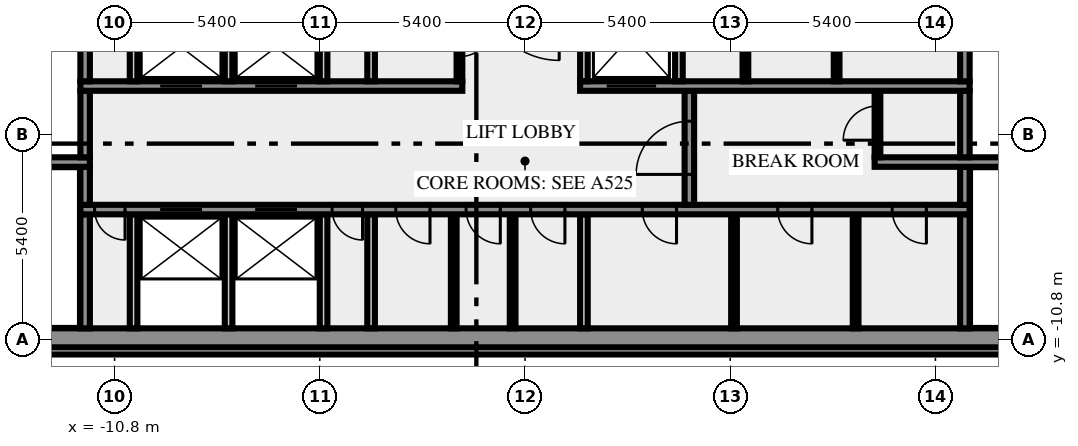
"""IFC4 building model, lengths in metres.
Left out: names, types, materials, properties, quantities, classifications, styles, units other than length and angle.
Written with IfcOpenShell. Run it as: python <this file> out.ifc"""

import sys

from ifc_helpers import new_model, si_unit, direction, frame, frame_2d, origin, place, context, subcontext, project, spatial, rectangle, extrude, element, fill, save


model = new_model("IFC4")
c1 = context("Model", 3, precision=1e-05, world=origin(), true_north=direction((0.0, 1.0)))
c2 = subcontext(c1, "Body", "Model", "MODEL_VIEW")
j1 = project(units=[si_unit("LENGTHUNIT", "METRE"), si_unit("PLANEANGLEUNIT", "RADIAN")], contexts=[c1])
p1 = place(None, origin())
s1 = spatial("IfcSite", under=j1, at=p1, CompositionType="ELEMENT")
p2 = place(p1, origin())
s2 = spatial("IfcBuilding", under=s1, at=p2, CompositionType="ELEMENT")
p3 = place(p2, frame((0.0, 0.0, 339.0)))
s3 = spatial("IfcBuildingStorey", under=s2, at=p3, CompositionType="ELEMENT", Elevation=339.0)
p4 = place(p3, frame((-17.444, -11.088, 0.0), z_axis=(0.0, 0.0, 1.0), x_axis=(1.0, 0.0, 0.0)))
e1 = element("IfcWall", 1, at=p4, inside=s3, PredefinedType="SOLIDWALL", context=c2, shape_type="SweptSolid", body=[
    extrude(rectangle(XDim=34.888, YDim=0.2, at=frame_2d((17.444, 0.0))), origin(), (0.0, 0.0, 1.0), 3.65),
])
p5 = place(p3, frame((-20.0, -10.75, 0.0), z_axis=(0.0, 0.0, 1.0), x_axis=(1.0, 0.0, 0.0)))
e2 = element("IfcWall", 2, at=p5, inside=s3, PredefinedType="SHEAR", context=c2, shape_type="SweptSolid", body=[
    extrude(rectangle(XDim=40.0, YDim=0.5, at=frame_2d((20.0, 0.0))), origin(), (0.0, 0.0, 1.0), 3.65),
])
p6 = place(p5, frame((0.8, 0.0, 1.0)))
e3 = element("IfcOpeningElement", 3, at=p6, cuts=e2, PredefinedType="OPENING", context=c2, shape_type="SweptSolid", body=[
    extrude(rectangle(XDim=1.2, YDim=1.2, at=frame_2d((0.6, 0.6))), frame((0.0, 0.26, 0.0), z_axis=(0.0, -1.0, 0.0), x_axis=(1.0, 0.0, 0.0)), (0.0, 0.0, 1.0), 0.52),
])
p7 = place(p5, frame((38.0, 0.0, 1.0)))
e4 = element("IfcOpeningElement", 4, at=p7, cuts=e2, PredefinedType="OPENING", context=c2, shape_type="SweptSolid", body=[
    extrude(rectangle(XDim=1.2, YDim=1.2, at=frame_2d((0.6, 0.6))), frame((0.0, 0.26, 0.0), z_axis=(0.0, -1.0, 0.0), x_axis=(1.0, 0.0, 0.0)), (0.0, 0.0, 1.0), 0.52),
])
p8 = place(p3, frame((-11.575, -10.5, 0.0), z_axis=(0.0, 0.0, 1.0), x_axis=(0.0, 1.0, 0.0)))
e5 = element("IfcWall", 5, at=p8, inside=s3, PredefinedType="SHEAR", context=c2, shape_type="SweptSolid", body=[
    extrude(rectangle(XDim=3.0, YDim=0.25, at=frame_2d((1.5, 0.0))), origin(), (0.0, 0.0, 1.0), 3.65),
])
for number, where, z_axis, x_axis in (
    (6, (-10.3, -10.5, 0.0), (0.0, 0.0, 1.0), (0.0, 1.0, 0.0)),
    (7, (-7.8, -10.5, 0.0), (0.0, 0.0, 1.0), (0.0, 1.0, 0.0)),
    (8, (-5.3, -10.5, 0.0), (0.0, 0.0, 1.0), (0.0, 1.0, 0.0)),
    (9, (-4.05, -10.5, 0.0), (0.0, 0.0, 1.0), (0.0, 1.0, 0.0)),
):
    element("IfcWall", number, at=place(p3, frame(where, z_axis=z_axis, x_axis=x_axis)), inside=s3, PredefinedType="SOLIDWALL", context=c2, shape_type="SweptSolid", body=[
        extrude(rectangle(XDim=3.0, YDim=0.2, at=frame_2d((1.5, 0.0))), origin(), (0.0, 0.0, 1.0), 3.65),
    ])
for number, where, z_axis, x_axis in (
    (10, (-1.875, -10.5, 0.0), (0.0, 0.0, 1.0), (0.0, 1.0, 0.0)),
    (11, (-0.325, -10.5, 0.0), (0.0, 0.0, 1.0), (0.0, 1.0, 0.0)),
):
    element("IfcWall", number, at=place(p3, frame(where, z_axis=z_axis, x_axis=x_axis)), inside=s3, PredefinedType="PARTITIONING", context=c2, shape_type="SweptSolid", body=[
        extrude(rectangle(XDim=3.0, YDim=0.15, at=frame_2d((1.5, 0.0))), origin(), (0.0, 0.0, 1.0), 3.65),
    ])
p9 = place(p3, frame((1.55, -10.5, 0.0), z_axis=(0.0, 0.0, 1.0), x_axis=(0.0, 1.0, 0.0)))
e12 = element("IfcWall", 12, at=p9, inside=s3, PredefinedType="SOLIDWALL", context=c2, shape_type="SweptSolid", body=[
    extrude(rectangle(XDim=3.0, YDim=0.2, at=frame_2d((1.5, 0.0))), origin(), (0.0, 0.0, 1.0), 3.65),
])
for number, where, z_axis, x_axis in (
    (13, (5.5, -10.5, 0.0), (0.0, 0.0, 1.0), (0.0, 1.0, 0.0)),
    (14, (8.7, -10.5, 0.0), (0.0, 0.0, 1.0), (0.0, 1.0, 0.0)),
):
    element("IfcWall", number, at=place(p3, frame(where, z_axis=z_axis, x_axis=x_axis)), inside=s3, PredefinedType="PARTITIONING", context=c2, shape_type="SweptSolid", body=[
        extrude(rectangle(XDim=3.0, YDim=0.15, at=frame_2d((1.5, 0.0))), origin(), (0.0, 0.0, 1.0), 3.65),
    ])
p10 = place(p3, frame((11.575, -10.5, 0.0), z_axis=(0.0, 0.0, 1.0), x_axis=(0.0, 1.0, 0.0)))
e15 = element("IfcWall", 15, at=p10, inside=s3, PredefinedType="SHEAR", context=c2, shape_type="SweptSolid", body=[
    extrude(rectangle(XDim=3.0, YDim=0.25, at=frame_2d((1.5, 0.0))), origin(), (0.0, 0.0, 1.0), 3.65),
])
p11 = place(p3, frame((11.7, -7.375, 0.0), z_axis=(0.0, 0.0, 1.0), x_axis=(-1.0, 0.0, 0.0)))
e16 = element("IfcWall", 16, at=p11, inside=s3, PredefinedType="SHEAR", context=c2, shape_type="SweptSolid", body=[
    extrude(rectangle(XDim=23.4, YDim=0.25, at=frame_2d((11.7, 0.0))), origin(), (0.0, 0.0, 1.0), 3.65),
])
p12 = place(p11, frame((22.225, 0.0, 0.0)))
e17 = element("IfcOpeningElement", 17, at=p12, cuts=e16, PredefinedType="OPENING", context=c2, shape_type="SweptSolid", body=[
    extrude(rectangle(XDim=0.8, YDim=2.1, at=frame_2d((0.4, 1.05))), frame((0.0, 0.135, 0.0), z_axis=(0.0, -1.0, 0.0), x_axis=(1.0, 0.0, 0.0)), (0.0, 0.0, 1.0), 0.27),
])
p13 = place(p11, frame((20.2, 0.0, 0.0)))
e18 = element("IfcOpeningElement", 18, at=p13, cuts=e16, PredefinedType="OPENING", context=c2, shape_type="SweptSolid", body=[
    extrude(rectangle(XDim=1.1, YDim=2.1, at=frame_2d((0.55, 1.05))), frame((0.0, 0.135, 0.0), z_axis=(0.0, -1.0, 0.0), x_axis=(1.0, 0.0, 0.0)), (0.0, 0.0, 1.0), 0.27),
])
p14 = place(p11, frame((17.7, 0.0, 0.0)))
e19 = element("IfcOpeningElement", 19, at=p14, cuts=e16, PredefinedType="OPENING", context=c2, shape_type="SweptSolid", body=[
    extrude(rectangle(XDim=1.1, YDim=2.1, at=frame_2d((0.55, 1.05))), frame((0.0, 0.135, 0.0), z_axis=(0.0, -1.0, 0.0), x_axis=(1.0, 0.0, 0.0)), (0.0, 0.0, 1.0), 0.27),
])
p15 = place(p11, frame((15.975, 0.0, 0.0)))
e20 = element("IfcOpeningElement", 20, at=p15, cuts=e16, PredefinedType="OPENING", context=c2, shape_type="SweptSolid", body=[
    extrude(rectangle(XDim=0.8, YDim=2.1, at=frame_2d((0.4, 1.05))), frame((0.0, 0.135, 0.0), z_axis=(0.0, -1.0, 0.0), x_axis=(1.0, 0.0, 0.0)), (0.0, 0.0, 1.0), 0.27),
])
p16 = place(p11, frame((14.2, 0.0, 0.0)))
e21 = element("IfcOpeningElement", 21, at=p16, cuts=e16, PredefinedType="OPENING", context=c2, shape_type="SweptSolid", body=[
    extrude(rectangle(XDim=0.9, YDim=2.1, at=frame_2d((0.45, 1.05))), frame((0.0, 0.135, 0.0), z_axis=(0.0, -1.0, 0.0), x_axis=(1.0, 0.0, 0.0)), (0.0, 0.0, 1.0), 0.27),
])
p17 = place(p11, frame((12.35, 0.0, 0.0)))
e22 = element("IfcOpeningElement", 22, at=p17, cuts=e16, PredefinedType="OPENING", context=c2, shape_type="SweptSolid", body=[
    extrude(rectangle(XDim=0.9, YDim=2.1, at=frame_2d((0.45, 1.05))), frame((0.0, 0.135, 0.0), z_axis=(0.0, -1.0, 0.0), x_axis=(1.0, 0.0, 0.0)), (0.0, 0.0, 1.0), 0.27),
])
p18 = place(p11, frame((10.65, 0.0, 0.0)))
e23 = element("IfcOpeningElement", 23, at=p18, cuts=e16, PredefinedType="OPENING", context=c2, shape_type="SweptSolid", body=[
    extrude(rectangle(XDim=0.9, YDim=2.1, at=frame_2d((0.45, 1.05))), frame((0.0, 0.135, 0.0), z_axis=(0.0, -1.0, 0.0), x_axis=(1.0, 0.0, 0.0)), (0.0, 0.0, 1.0), 0.27),
])
p19 = place(p11, frame((7.713, 0.0, 0.0)))
e24 = element("IfcOpeningElement", 24, at=p19, cuts=e16, PredefinedType="OPENING", context=c2, shape_type="SweptSolid", body=[
    extrude(rectangle(XDim=0.9, YDim=2.1, at=frame_2d((0.45, 1.05))), frame((0.0, 0.135, 0.0), z_axis=(0.0, -1.0, 0.0), x_axis=(1.0, 0.0, 0.0)), (0.0, 0.0, 1.0), 0.27),
])
p20 = place(p11, frame((4.15, 0.0, 0.0)))
e25 = element("IfcOpeningElement", 25, at=p20, cuts=e16, PredefinedType="OPENING", context=c2, shape_type="SweptSolid", body=[
    extrude(rectangle(XDim=0.9, YDim=2.1, at=frame_2d((0.45, 1.05))), frame((0.0, 0.135, 0.0), z_axis=(0.0, -1.0, 0.0), x_axis=(1.0, 0.0, 0.0)), (0.0, 0.0, 1.0), 0.27),
])
p21 = place(p11, frame((1.138, 0.0, 0.0)))
e26 = element("IfcOpeningElement", 26, at=p21, cuts=e16, PredefinedType="OPENING", context=c2, shape_type="SweptSolid", body=[
    extrude(rectangle(XDim=0.9, YDim=2.1, at=frame_2d((0.45, 1.05))), frame((0.0, 0.135, 0.0), z_axis=(0.0, -1.0, 0.0), x_axis=(1.0, 0.0, 0.0)), (0.0, 0.0, 1.0), 0.27),
])
p22 = place(p3, frame((-11.575, -7.25, 0.0), z_axis=(0.0, 0.0, 1.0), x_axis=(0.0, 1.0, 0.0)))
e27 = element("IfcWall", 27, at=p22, inside=s3, PredefinedType="SHEAR", context=c2, shape_type="SweptSolid", body=[
    extrude(rectangle(XDim=1.0, YDim=0.25, at=frame_2d((0.5, 0.0))), origin(), (0.0, 0.0, 1.0), 3.65),
])
p23 = place(p3, frame((4.325, -7.25, 0.0), z_axis=(0.0, 0.0, 1.0), x_axis=(0.0, 1.0, 0.0)))
e28 = element("IfcWall", 28, at=p23, inside=s3, PredefinedType="SHEAR", context=c2, shape_type="SweptSolid", body=[
    extrude(rectangle(XDim=3.0, YDim=0.25, at=frame_2d((1.5, 0.0))), origin(), (0.0, 0.0, 1.0), 3.65),
])
p24 = place(p23, frame((0.8, 0.0, 0.0)))
e29 = element("IfcOpeningElement", 29, at=p24, cuts=e28, PredefinedType="OPENING", context=c2, shape_type="SweptSolid", body=[
    extrude(rectangle(XDim=1.4, YDim=2.1, at=frame_2d((0.7, 1.05))), frame((0.0, 0.135, 0.0), z_axis=(0.0, -1.0, 0.0), x_axis=(1.0, 0.0, 0.0)), (0.0, 0.0, 1.0), 0.27),
])
p25 = place(p3, frame((11.575, -7.25, 0.0), z_axis=(0.0, 0.0, 1.0), x_axis=(0.0, 1.0, 0.0)))
e30 = element("IfcWall", 30, at=p25, inside=s3, PredefinedType="SHEAR", context=c2, shape_type="SweptSolid", body=[
    extrude(rectangle(XDim=1.0, YDim=0.25, at=frame_2d((0.5, 0.0))), origin(), (0.0, 0.0, 1.0), 3.65),
])
p26 = place(p3, frame((-11.45, -6.125, 0.0), z_axis=(0.0, 0.0, 1.0), x_axis=(-1.0, 0.0, 0.0)))
e31 = element("IfcWall", 31, at=p26, inside=s3, PredefinedType="SHEAR", context=c2, shape_type="SweptSolid", body=[
    extrude(rectangle(XDim=8.05, YDim=0.25, at=frame_2d((4.025, 0.0))), origin(), (0.0, 0.0, 1.0), 3.65),
])
p27 = place(p26, frame((6.2, 0.0, 0.0)))
e32 = element("IfcOpeningElement", 32, at=p27, cuts=e31, PredefinedType="OPENING", context=c2, shape_type="SweptSolid", body=[
    extrude(rectangle(XDim=1.8, YDim=2.1, at=frame_2d((0.9, 1.05))), frame((0.0, 0.135, 0.0), z_axis=(0.0, -1.0, 0.0), x_axis=(1.0, 0.0, 0.0)), (0.0, 0.0, 1.0), 0.27),
])
p28 = place(p3, frame((20.0, -6.125, 0.0), z_axis=(0.0, 0.0, 1.0), x_axis=(-1.0, 0.0, 0.0)))
e33 = element("IfcWall", 33, at=p28, inside=s3, PredefinedType="SHEAR", context=c2, shape_type="SweptSolid", body=[
    extrude(rectangle(XDim=10.8, YDim=0.25, at=frame_2d((5.4, 0.0))), origin(), (0.0, 0.0, 1.0), 3.65),
])
p29 = place(p28, frame((0.55, 0.0, 0.0)))
e34 = element("IfcOpeningElement", 34, at=p29, cuts=e33, PredefinedType="OPENING", context=c2, shape_type="SweptSolid", body=[
    extrude(rectangle(XDim=1.8, YDim=2.1, at=frame_2d((0.9, 1.05))), frame((0.0, 0.135, 0.0), z_axis=(0.0, -1.0, 0.0), x_axis=(1.0, 0.0, 0.0)), (0.0, 0.0, 1.0), 0.27),
])
p30 = place(p3, frame((-11.575, -6.0, 0.0), z_axis=(0.0, 0.0, 1.0), x_axis=(0.0, 1.0, 0.0)))
e35 = element("IfcWall", 35, at=p30, inside=s3, PredefinedType="SHEAR", context=c2, shape_type="SweptSolid", body=[
    extrude(rectangle(XDim=1.75, YDim=0.25, at=frame_2d((0.875, 0.0))), origin(), (0.0, 0.0, 1.0), 3.65),
])
p31 = place(p3, frame((9.275, -6.0, 0.0), z_axis=(0.0, 0.0, 1.0), x_axis=(0.0, 1.0, 0.0)))
e36 = element("IfcWall", 36, at=p31, inside=s3, PredefinedType="PARTITIONING", context=c2, shape_type="SweptSolid", body=[
    extrude(rectangle(XDim=1.75, YDim=0.15, at=frame_2d((0.875, 0.0))), origin(), (0.0, 0.0, 1.0), 3.65),
])
p32 = place(p31, frame((0.45, 0.0, 0.0)))
e37 = element("IfcOpeningElement", 37, at=p32, cuts=e36, PredefinedType="OPENING", context=c2, shape_type="SweptSolid", body=[
    extrude(rectangle(XDim=0.9, YDim=2.1, at=frame_2d((0.45, 1.05))), frame((0.0, 0.085, 0.0), z_axis=(0.0, -1.0, 0.0), x_axis=(1.0, 0.0, 0.0)), (0.0, 0.0, 1.0), 0.17),
])
p33 = place(p3, frame((11.575, -6.0, 0.0), z_axis=(0.0, 0.0, 1.0), x_axis=(0.0, 1.0, 0.0)))
e38 = element("IfcWall", 38, at=p33, inside=s3, PredefinedType="SHEAR", context=c2, shape_type="SweptSolid", body=[
    extrude(rectangle(XDim=1.75, YDim=0.25, at=frame_2d((0.875, 0.0))), origin(), (0.0, 0.0, 1.0), 3.65),
])
p34 = place(p3, frame((-11.7, -4.125, 0.0), z_axis=(0.0, 0.0, 1.0), x_axis=(1.0, 0.0, 0.0)))
e39 = element("IfcWall", 39, at=p34, inside=s3, PredefinedType="SHEAR", context=c2, shape_type="SweptSolid", body=[
    extrude(rectangle(XDim=10.05, YDim=0.25, at=frame_2d((5.025, 0.0))), origin(), (0.0, 0.0, 1.0), 3.65),
])
p35 = place(p34, frame((2.1, 0.0, 0.0)))
e40 = element("IfcOpeningElement", 40, at=p35, cuts=e39, PredefinedType="OPENING", context=c2, shape_type="SweptSolid", body=[
    extrude(rectangle(XDim=1.1, YDim=2.1, at=frame_2d((0.55, 1.05))), frame((0.0, 0.135, 0.0), z_axis=(0.0, -1.0, 0.0), x_axis=(1.0, 0.0, 0.0)), (0.0, 0.0, 1.0), 0.27),
])
p36 = place(p34, frame((4.6, 0.0, 0.0)))
e41 = element("IfcOpeningElement", 41, at=p36, cuts=e39, PredefinedType="OPENING", context=c2, shape_type="SweptSolid", body=[
    extrude(rectangle(XDim=1.1, YDim=2.1, at=frame_2d((0.55, 1.05))), frame((0.0, 0.135, 0.0), z_axis=(0.0, -1.0, 0.0), x_axis=(1.0, 0.0, 0.0)), (0.0, 0.0, 1.0), 0.27),
])
p37 = place(p3, frame((1.45, -4.125, 0.0), z_axis=(0.0, 0.0, 1.0), x_axis=(1.0, 0.0, 0.0)))
e42 = element("IfcWall", 42, at=p37, inside=s3, PredefinedType="SHEAR", context=c2, shape_type="SweptSolid", body=[
    extrude(rectangle(XDim=10.25, YDim=0.25, at=frame_2d((5.125, 0.0))), origin(), (0.0, 0.0, 1.0), 3.65),
])
p38 = place(p37, frame((0.7, 0.0, 0.0)))
e43 = element("IfcOpeningElement", 43, at=p38, cuts=e42, PredefinedType="OPENING", context=c2, shape_type="SweptSolid", body=[
    extrude(rectangle(XDim=1.3, YDim=2.1, at=frame_2d((0.65, 1.05))), frame((0.0, 0.135, 0.0), z_axis=(0.0, -1.0, 0.0), x_axis=(1.0, 0.0, 0.0)), (0.0, 0.0, 1.0), 0.27),
])
p39 = place(p3, frame((-11.575, -4.0, 0.0), z_axis=(0.0, 0.0, 1.0), x_axis=(0.0, 1.0, 0.0)))
e44 = element("IfcWall", 44, at=p39, inside=s3, PredefinedType="SHEAR", context=c2, shape_type="SweptSolid", body=[
    extrude(rectangle(XDim=2.3, YDim=0.25, at=frame_2d((1.15, 0.0))), origin(), (0.0, 0.0, 1.0), 3.65),
])
for number, where, z_axis, x_axis in (
    (45, (-10.3, -4.0, 0.0), (0.0, 0.0, 1.0), (0.0, 1.0, 0.0)),
    (46, (-7.8, -4.0, 0.0), (0.0, 0.0, 1.0), (0.0, 1.0, 0.0)),
    (47, (-5.3, -4.0, 0.0), (0.0, 0.0, 1.0), (0.0, 1.0, 0.0)),
    (48, (-4.05, -4.0, 0.0), (0.0, 0.0, 1.0), (0.0, 1.0, 0.0)),
):
    element("IfcWall", number, at=place(p3, frame(where, z_axis=z_axis, x_axis=x_axis)), inside=s3, PredefinedType="SOLIDWALL", context=c2, shape_type="SweptSolid", body=[
        extrude(rectangle(XDim=2.3, YDim=0.2, at=frame_2d((1.15, 0.0))), origin(), (0.0, 0.0, 1.0), 3.65),
    ])
p40 = place(p3, frame((-1.725, -1.7, 0.0), z_axis=(0.0, 0.0, 1.0), x_axis=(0.0, -1.0, 0.0)))
e49 = element("IfcWall", 49, at=p40, inside=s3, PredefinedType="PARTITIONING", context=c2, shape_type="SweptSolid", body=[
    extrude(rectangle(XDim=2.3, YDim=0.15, at=frame_2d((1.15, 0.0))), origin(), (0.0, 0.0, 1.0), 3.65),
])
p41 = place(p40, frame((0.75, 0.0, 0.0)))
e50 = element("IfcOpeningElement", 50, at=p41, cuts=e49, PredefinedType="OPENING", context=c2, shape_type="SweptSolid", body=[
    extrude(rectangle(XDim=0.9, YDim=2.1, at=frame_2d((0.45, 1.05))), frame((0.0, 0.085, 0.0), z_axis=(0.0, -1.0, 0.0), x_axis=(1.0, 0.0, 0.0)), (0.0, 0.0, 1.0), 0.17),
])
for number, where, z_axis, x_axis in (
    (51, (1.55, -4.0, 0.0), (0.0, 0.0, 1.0), (0.0, 1.0, 0.0)),
    (52, (4.05, -4.0, 0.0), (0.0, 0.0, 1.0), (0.0, 1.0, 0.0)),
):
    element("IfcWall", number, at=place(p3, frame(where, z_axis=z_axis, x_axis=x_axis)), inside=s3, PredefinedType="SOLIDWALL", context=c2, shape_type="SweptSolid", body=[
        extrude(rectangle(XDim=2.3, YDim=0.2, at=frame_2d((1.15, 0.0))), origin(), (0.0, 0.0, 1.0), 3.65),
    ])
for number, where, z_axis, x_axis in (
    (53, (5.8, -4.0, 0.0), (0.0, 0.0, 1.0), (0.0, 1.0, 0.0)),
    (54, (8.2, -4.0, 0.0), (0.0, 0.0, 1.0), (0.0, 1.0, 0.0)),
):
    element("IfcWall", number, at=place(p3, frame(where, z_axis=z_axis, x_axis=x_axis)), inside=s3, PredefinedType="PARTITIONING", context=c2, shape_type="SweptSolid", body=[
        extrude(rectangle(XDim=2.3, YDim=0.15, at=frame_2d((1.15, 0.0))), origin(), (0.0, 0.0, 1.0), 3.65),
    ])
p42 = place(p3, frame((11.575, -4.0, 0.0), z_axis=(0.0, 0.0, 1.0), x_axis=(0.0, 1.0, 0.0)))
e55 = element("IfcWall", 55, at=p42, inside=s3, PredefinedType="SHEAR", context=c2, shape_type="SweptSolid", body=[
    extrude(rectangle(XDim=2.3, YDim=0.25, at=frame_2d((1.15, 0.0))), origin(), (0.0, 0.0, 1.0), 3.65),
])
p43 = place(p12, origin())
e56 = element("IfcDoor", 56, at=p43, inside=s3, OperationType="SINGLE_SWING_RIGHT", PredefinedType="DOOR", context=c2, shape_type="SweptSolid", body=[
    extrude(rectangle(XDim=0.8, YDim=2.1, at=frame_2d((0.4, 1.05))), frame((0.0, 0.025, 0.0), z_axis=(0.0, -1.0, 0.0), x_axis=(1.0, 0.0, 0.0)), (0.0, 0.0, 1.0), 0.05),
])
fill(e17, e56)
p44 = place(p13, origin())
e57 = element("IfcDoor", 57, at=p44, inside=s3, OperationType="DOUBLE_DOOR_SLIDING", PredefinedType="DOOR", context=c2, shape_type="SweptSolid", body=[
    extrude(rectangle(XDim=1.1, YDim=2.1, at=frame_2d((0.55, 1.05))), frame((0.0, 0.025, 0.0), z_axis=(0.0, -1.0, 0.0), x_axis=(1.0, 0.0, 0.0)), (0.0, 0.0, 1.0), 0.05),
])
fill(e18, e57)
p45 = place(p14, origin())
e58 = element("IfcDoor", 58, at=p45, inside=s3, OperationType="DOUBLE_DOOR_SLIDING", PredefinedType="DOOR", context=c2, shape_type="SweptSolid", body=[
    extrude(rectangle(XDim=1.1, YDim=2.1, at=frame_2d((0.55, 1.05))), frame((0.0, 0.025, 0.0), z_axis=(0.0, -1.0, 0.0), x_axis=(1.0, 0.0, 0.0)), (0.0, 0.0, 1.0), 0.05),
])
fill(e19, e58)
p46 = place(p15, origin())
e59 = element("IfcDoor", 59, at=p46, inside=s3, OperationType="SINGLE_SWING_RIGHT", PredefinedType="DOOR", context=c2, shape_type="SweptSolid", body=[
    extrude(rectangle(XDim=0.8, YDim=2.1, at=frame_2d((0.4, 1.05))), frame((0.0, 0.025, 0.0), z_axis=(0.0, -1.0, 0.0), x_axis=(1.0, 0.0, 0.0)), (0.0, 0.0, 1.0), 0.05),
])
fill(e20, e59)
p47 = place(p16, origin())
e60 = element("IfcDoor", 60, at=p47, inside=s3, OperationType="SINGLE_SWING_RIGHT", PredefinedType="DOOR", context=c2, shape_type="SweptSolid", body=[
    extrude(rectangle(XDim=0.9, YDim=2.1, at=frame_2d((0.45, 1.05))), frame((0.0, 0.025, 0.0), z_axis=(0.0, -1.0, 0.0), x_axis=(1.0, 0.0, 0.0)), (0.0, 0.0, 1.0), 0.05),
])
fill(e21, e60)
p48 = place(p17, origin())
e61 = element("IfcDoor", 61, at=p48, inside=s3, OperationType="SINGLE_SWING_RIGHT", PredefinedType="DOOR", context=c2, shape_type="SweptSolid", body=[
    extrude(rectangle(XDim=0.9, YDim=2.1, at=frame_2d((0.45, 1.05))), frame((0.0, 0.025, 0.0), z_axis=(0.0, -1.0, 0.0), x_axis=(1.0, 0.0, 0.0)), (0.0, 0.0, 1.0), 0.05),
])
fill(e22, e61)
p49 = place(p18, origin())
e62 = element("IfcDoor", 62, at=p49, inside=s3, OperationType="SINGLE_SWING_LEFT", PredefinedType="DOOR", context=c2, shape_type="SweptSolid", body=[
    extrude(rectangle(XDim=0.9, YDim=2.1, at=frame_2d((0.45, 1.05))), frame((0.0, 0.025, 0.0), z_axis=(0.0, -1.0, 0.0), x_axis=(1.0, 0.0, 0.0)), (0.0, 0.0, 1.0), 0.05),
])
fill(e23, e62)
p50 = place(p19, origin())
e63 = element("IfcDoor", 63, at=p50, inside=s3, OperationType="SINGLE_SWING_LEFT", PredefinedType="DOOR", context=c2, shape_type="SweptSolid", body=[
    extrude(rectangle(XDim=0.9, YDim=2.1, at=frame_2d((0.45, 1.05))), frame((0.0, 0.025, 0.0), z_axis=(0.0, -1.0, 0.0), x_axis=(1.0, 0.0, 0.0)), (0.0, 0.0, 1.0), 0.05),
])
fill(e24, e63)
p51 = place(p20, origin())
e64 = element("IfcDoor", 64, at=p51, inside=s3, OperationType="SINGLE_SWING_LEFT", PredefinedType="DOOR", context=c2, shape_type="SweptSolid", body=[
    extrude(rectangle(XDim=0.9, YDim=2.1, at=frame_2d((0.45, 1.05))), frame((0.0, 0.025, 0.0), z_axis=(0.0, -1.0, 0.0), x_axis=(1.0, 0.0, 0.0)), (0.0, 0.0, 1.0), 0.05),
])
fill(e25, e64)
p52 = place(p21, origin())
e65 = element("IfcDoor", 65, at=p52, inside=s3, OperationType="SINGLE_SWING_LEFT", PredefinedType="DOOR", context=c2, shape_type="SweptSolid", body=[
    extrude(rectangle(XDim=0.9, YDim=2.1, at=frame_2d((0.45, 1.05))), frame((0.0, 0.025, 0.0), z_axis=(0.0, -1.0, 0.0), x_axis=(1.0, 0.0, 0.0)), (0.0, 0.0, 1.0), 0.05),
])
fill(e26, e65)
p53 = place(p24, origin())
e66 = element("IfcDoor", 66, at=p53, inside=s3, OperationType="DOUBLE_DOOR_SINGLE_SWING", PredefinedType="DOOR", context=c2, shape_type="SweptSolid", body=[
    extrude(rectangle(XDim=1.4, YDim=2.1, at=frame_2d((0.7, 1.05))), frame((0.0, 0.025, 0.0), z_axis=(0.0, -1.0, 0.0), x_axis=(1.0, 0.0, 0.0)), (0.0, 0.0, 1.0), 0.05),
])
fill(e29, e66)
p54 = place(p32, origin())
e67 = element("IfcDoor", 67, at=p54, inside=s3, OperationType="SINGLE_SWING_RIGHT", PredefinedType="DOOR", context=c2, shape_type="SweptSolid", body=[
    extrude(rectangle(XDim=0.9, YDim=2.1, at=frame_2d((0.45, 1.05))), frame((0.0, 0.025, 0.0), z_axis=(0.0, -1.0, 0.0), x_axis=(1.0, 0.0, 0.0)), (0.0, 0.0, 1.0), 0.05),
])
fill(e37, e67)
p55 = place(p35, origin())
e68 = element("IfcDoor", 68, at=p55, inside=s3, OperationType="DOUBLE_DOOR_SLIDING", PredefinedType="DOOR", context=c2, shape_type="SweptSolid", body=[
    extrude(rectangle(XDim=1.1, YDim=2.1, at=frame_2d((0.55, 1.05))), frame((0.0, 0.025, 0.0), z_axis=(0.0, -1.0, 0.0), x_axis=(1.0, 0.0, 0.0)), (0.0, 0.0, 1.0), 0.05),
])
fill(e40, e68)
p56 = place(p36, origin())
e69 = element("IfcDoor", 69, at=p56, inside=s3, OperationType="DOUBLE_DOOR_SLIDING", PredefinedType="DOOR", context=c2, shape_type="SweptSolid", body=[
    extrude(rectangle(XDim=1.1, YDim=2.1, at=frame_2d((0.55, 1.05))), frame((0.0, 0.025, 0.0), z_axis=(0.0, -1.0, 0.0), x_axis=(1.0, 0.0, 0.0)), (0.0, 0.0, 1.0), 0.05),
])
fill(e41, e69)
p57 = place(p38, origin())
e70 = element("IfcDoor", 70, at=p57, inside=s3, OperationType="DOUBLE_DOOR_SLIDING", PredefinedType="DOOR", context=c2, shape_type="SweptSolid", body=[
    extrude(rectangle(XDim=1.3, YDim=2.1, at=frame_2d((0.65, 1.05))), frame((0.0, 0.025, 0.0), z_axis=(0.0, -1.0, 0.0), x_axis=(1.0, 0.0, 0.0)), (0.0, 0.0, 1.0), 0.05),
])
fill(e43, e70)
p58 = place(p41, origin())
e71 = element("IfcDoor", 71, at=p58, inside=s3, OperationType="SINGLE_SWING_RIGHT", PredefinedType="DOOR", context=c2, shape_type="SweptSolid", body=[
    extrude(rectangle(XDim=0.9, YDim=2.1, at=frame_2d((0.45, 1.05))), frame((0.0, 0.025, 0.0), z_axis=(0.0, -1.0, 0.0), x_axis=(1.0, 0.0, 0.0)), (0.0, 0.0, 1.0), 0.05),
])
fill(e50, e71)
save(model, sys.argv[1])
